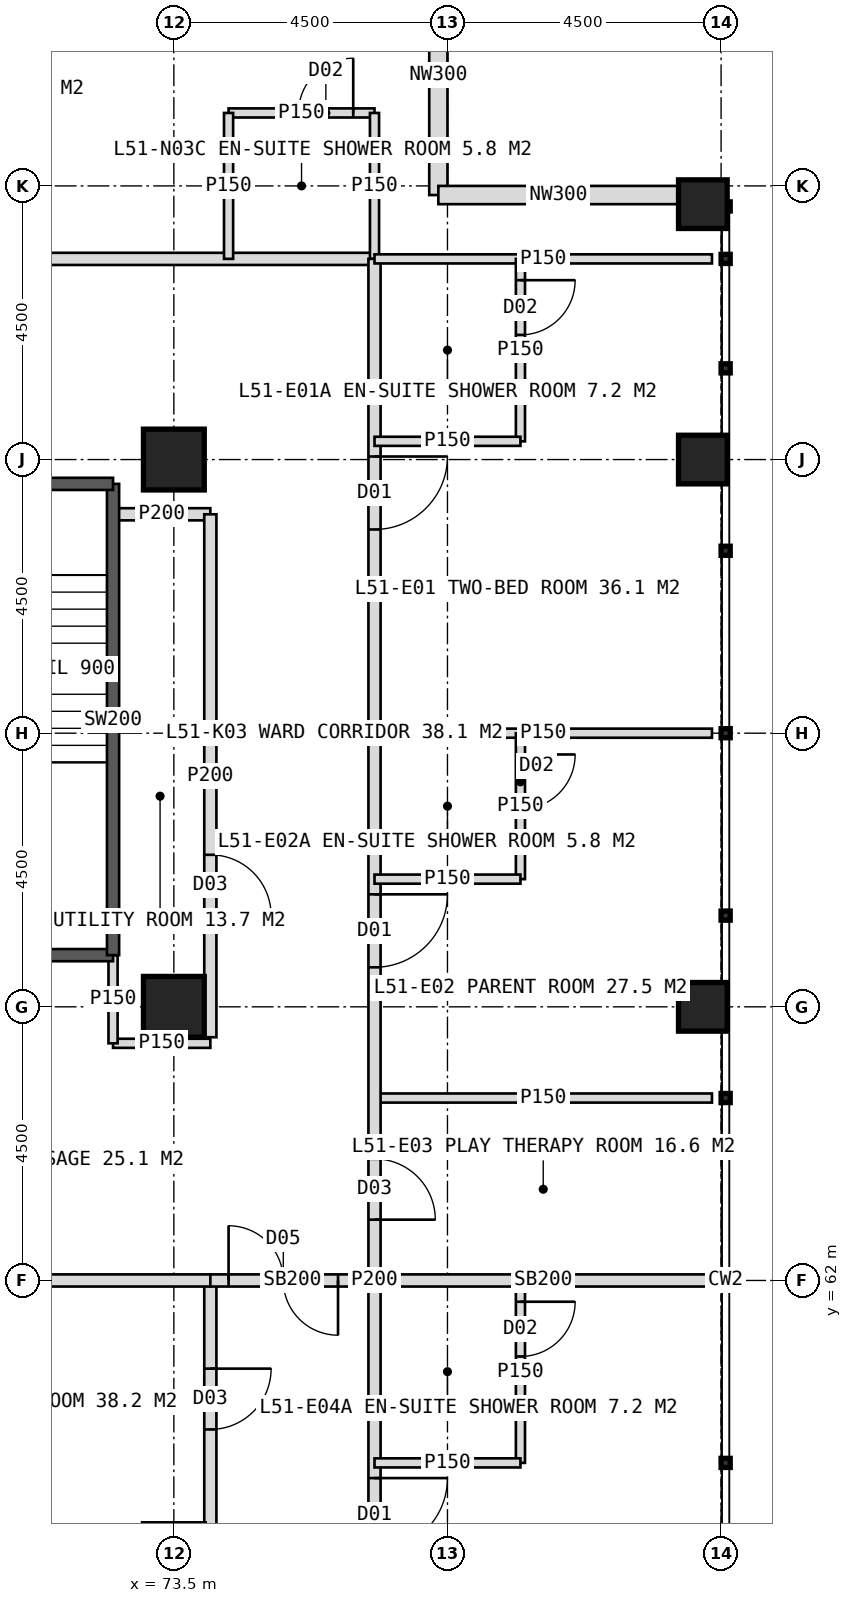
"""IFC4 building model, lengths in metres.
Left out: names, types, materials, properties, quantities, classifications, styles, units other than length and angle.
Written with IfcOpenShell. Run it as: python <this file> out.ifc"""

import sys

from ifc_helpers import new_model, si_unit, direction, frame, frame_2d, origin, origin_2d, place, context, subcontext, project, spatial, rectangle, hollow_rectangle, extrude, element, fill, save


model = new_model("IFC4")
c1 = context("Model", 3, precision=1e-05, world=origin(), true_north=direction((0.0, 1.0)))
c2 = subcontext(c1, "Body", "Model", "MODEL_VIEW")
j1 = project(units=[si_unit("LENGTHUNIT", "METRE"), si_unit("PLANEANGLEUNIT", "RADIAN")], contexts=[c1])
p1 = place(None, origin())
s1 = spatial("IfcSite", under=j1, at=p1, CompositionType="ELEMENT")
p2 = place(p1, origin())
s2 = spatial("IfcBuilding", under=s1, at=p2, CompositionType="ELEMENT")
p3 = place(p2, frame((0.0, 0.0, 213.0)))
s3 = spatial("IfcBuildingStorey", under=s2, at=p3, CompositionType="ELEMENT", Elevation=213.0)
for number, where, z_axis, x_axis in (
    (1, (73.5, 75.5, 0.0), (0.0, 0.0, 1.0), (1.0, 0.0, 0.0)),
    (2, (73.5, 66.5, 0.0), (0.0, 0.0, 1.0), (1.0, 0.0, 0.0)),
):
    element("IfcColumn", number, at=place(p3, frame(where, z_axis=z_axis, x_axis=x_axis)), inside=s3, PredefinedType="COLUMN", context=c2, shape_type="SweptSolid", body=[
        extrude(hollow_rectangle(XDim=1.0, YDim=1.0, WallThickness=0.1, at=origin_2d()), origin(), (0.0, 0.0, 1.0), 4.0),
    ])
for number, where, z_axis, x_axis in (
    (3, (82.2, 66.5, 0.0), (0.0, 0.0, 1.0), (1.0, 0.0, 0.0)),
    (4, (82.2, 75.5, 0.0), (0.0, 0.0, 1.0), (1.0, 0.0, 0.0)),
    (5, (82.2, 79.7, 0.0), (0.0, 0.0, 1.0), (1.0, 0.0, 0.0)),
):
    element("IfcColumn", number, at=place(p3, frame(where, z_axis=z_axis, x_axis=x_axis)), inside=s3, PredefinedType="COLUMN", context=c2, shape_type="SweptSolid", body=[
        extrude(hollow_rectangle(XDim=0.8, YDim=0.8, WallThickness=0.08, at=origin_2d()), origin(), (0.0, 0.0, 1.0), 4.0),
    ])
for number, where, z_axis, x_axis in (
    (6, (77.85, 83.8, 0.0), (0.0, 0.0, 1.0), (0.0, -1.0, 0.0)),
    (7, (77.85, 79.85, 0.0), (0.0, 0.0, 1.0), (1.0, 0.0, 0.0)),
):
    element("IfcWall", number, at=place(p3, frame(where, z_axis=z_axis, x_axis=x_axis)), inside=s3, PredefinedType="ELEMENTEDWALL", context=c2, shape_type="SweptSolid", body=[
        extrude(rectangle(XDim=3.95, YDim=0.3, at=frame_2d((1.975, 0.0))), origin(), (0.0, 0.0, 1.0), 2.85),
    ])
p4 = place(p3, frame((43.2, 78.8, 0.0), z_axis=(0.0, 0.0, 1.0), x_axis=(1.0, 0.0, 0.0)))
e8 = element("IfcWall", 8, at=p4, inside=s3, PredefinedType="PARTITIONING", context=c2, shape_type="SweptSolid", body=[
    extrude(rectangle(XDim=33.6, YDim=0.2, at=frame_2d((16.8, 0.0))), origin(), (0.0, 0.0, 1.0), 3.75),
])
p5 = place(p4, frame((4.9, 0.0, 0.0)))
e9 = element("IfcOpeningElement", 9, at=p5, cuts=e8, PredefinedType="OPENING", context=c2, shape_type="SweptSolid", body=[
    extrude(rectangle(XDim=1.0, YDim=2.1, at=frame_2d((0.5, 1.05))), frame((0.0, 0.11, 0.0), z_axis=(0.0, -1.0, 0.0), x_axis=(1.0, 0.0, 0.0)), (0.0, 0.0, 1.0), 0.22),
])
p6 = place(p4, frame((14.05, 0.0, 0.0)))
e10 = element("IfcOpeningElement", 10, at=p6, cuts=e8, PredefinedType="OPENING", context=c2, shape_type="SweptSolid", body=[
    extrude(rectangle(XDim=1.2, YDim=2.2, at=frame_2d((0.6, 1.1))), frame((0.0, 0.11, 0.0), z_axis=(0.0, -1.0, 0.0), x_axis=(1.0, 0.0, 0.0)), (0.0, 0.0, 1.0), 0.22),
])
p7 = place(p4, frame((22.45, 0.0, 0.0)))
e11 = element("IfcOpeningElement", 11, at=p7, cuts=e8, PredefinedType="OPENING", context=c2, shape_type="SweptSolid", body=[
    extrude(rectangle(XDim=1.2, YDim=2.2, at=frame_2d((0.6, 1.1))), frame((0.0, 0.11, 0.0), z_axis=(0.0, -1.0, 0.0), x_axis=(1.0, 0.0, 0.0)), (0.0, 0.0, 1.0), 0.22),
])
p8 = place(p3, frame((74.4, 81.2, 0.0), z_axis=(0.0, 0.0, 1.0), x_axis=(1.0, 0.0, 0.0)))
e12 = element("IfcWall", 12, at=p8, inside=s3, PredefinedType="PARTITIONING", context=c2, shape_type="SweptSolid", body=[
    extrude(rectangle(XDim=2.4, YDim=0.15, at=frame_2d((1.2, 0.0))), origin(), (0.0, 0.0, 1.0), 3.75),
])
p9 = place(p8, frame((1.15, 0.0, 0.0)))
e13 = element("IfcOpeningElement", 13, at=p9, cuts=e12, PredefinedType="OPENING", context=c2, shape_type="SweptSolid", body=[
    extrude(rectangle(XDim=0.9, YDim=2.1, at=frame_2d((0.45, 1.05))), frame((0.0, 0.085, 0.0), z_axis=(0.0, -1.0, 0.0), x_axis=(1.0, 0.0, 0.0)), (0.0, 0.0, 1.0), 0.17),
])
for number, where, z_axis, x_axis in (
    (14, (74.4, 78.8, 0.0), (0.0, 0.0, 1.0), (0.0, 1.0, 0.0)),
    (15, (76.8, 78.8, 0.0), (0.0, 0.0, 1.0), (0.0, 1.0, 0.0)),
):
    element("IfcWall", number, at=place(p3, frame(where, z_axis=z_axis, x_axis=x_axis)), inside=s3, PredefinedType="PARTITIONING", context=c2, shape_type="SweptSolid", body=[
        extrude(rectangle(XDim=2.4, YDim=0.15, at=frame_2d((1.2, 0.0))), origin(), (0.0, 0.0, 1.0), 3.75),
    ])
p10 = place(p3, frame((72.5, 74.6, 0.0), z_axis=(0.0, 0.0, 1.0), x_axis=(1.0, 0.0, 0.0)))
e16 = element("IfcWall", 16, at=p10, inside=s3, PredefinedType="PARTITIONING", context=c2, shape_type="SweptSolid", body=[
    extrude(rectangle(XDim=1.6, YDim=0.2, at=frame_2d((0.8, 0.0))), origin(), (0.0, 0.0, 1.0), 3.75),
])
for number, where, z_axis, x_axis in (
    (17, (76.8, 71.0, 0.0), (0.0, 0.0, 1.0), (1.0, 0.0, 0.0)),
    (18, (76.8, 65.0, 0.0), (0.0, 0.0, 1.0), (1.0, 0.0, 0.0)),
):
    element("IfcWall", number, at=place(p3, frame(where, z_axis=z_axis, x_axis=x_axis)), inside=s3, PredefinedType="PARTITIONING", context=c2, shape_type="SweptSolid", body=[
        extrude(rectangle(XDim=5.55, YDim=0.15, at=frame_2d((2.775, 0.0))), origin(), (0.0, 0.0, 1.0), 3.75),
    ])
p11 = place(p3, frame((76.8, 62.0, 0.0), z_axis=(0.0, 0.0, 1.0), x_axis=(1.0, 0.0, 0.0)))
e19 = element("IfcWall", 19, at=p11, inside=s3, PredefinedType="SOLIDWALL", context=c2, shape_type="SweptSolid", body=[
    extrude(rectangle(XDim=5.55, YDim=0.2, at=frame_2d((2.775, 0.0))), origin(), (0.0, 0.0, 1.0), 2.95),
])
p12 = place(p3, frame((76.8, 78.8, 0.0), z_axis=(0.0, 0.0, 1.0), x_axis=(0.0, -1.0, 0.0)))
e20 = element("IfcWall", 20, at=p12, inside=s3, PredefinedType="PARTITIONING", context=c2, shape_type="SweptSolid", body=[
    extrude(rectangle(XDim=33.6, YDim=0.2, at=frame_2d((16.8, 0.0))), origin(), (0.0, 0.0, 1.0), 3.75),
])
p13 = place(p12, frame((3.25, 0.0, 0.0)))
e21 = element("IfcOpeningElement", 21, at=p13, cuts=e20, PredefinedType="OPENING", context=c2, shape_type="SweptSolid", body=[
    extrude(rectangle(XDim=1.2, YDim=2.2, at=frame_2d((0.6, 1.1))), frame((0.0, 0.11, 0.0), z_axis=(0.0, -1.0, 0.0), x_axis=(1.0, 0.0, 0.0)), (0.0, 0.0, 1.0), 0.22),
])
p14 = place(p12, frame((10.45, 0.0, 0.0)))
e22 = element("IfcOpeningElement", 22, at=p14, cuts=e20, PredefinedType="OPENING", context=c2, shape_type="SweptSolid", body=[
    extrude(rectangle(XDim=1.2, YDim=2.2, at=frame_2d((0.6, 1.1))), frame((0.0, 0.11, 0.0), z_axis=(0.0, -1.0, 0.0), x_axis=(1.0, 0.0, 0.0)), (0.0, 0.0, 1.0), 0.22),
])
p15 = place(p12, frame((14.8, 0.0, 0.0)))
e23 = element("IfcOpeningElement", 23, at=p15, cuts=e20, PredefinedType="OPENING", context=c2, shape_type="SweptSolid", body=[
    extrude(rectangle(XDim=1.0, YDim=2.1, at=frame_2d((0.5, 1.05))), frame((0.0, 0.11, 0.0), z_axis=(0.0, -1.0, 0.0), x_axis=(1.0, 0.0, 0.0)), (0.0, 0.0, 1.0), 0.22),
])
p16 = place(p12, frame((20.05, 0.0, 0.0)))
e24 = element("IfcOpeningElement", 24, at=p16, cuts=e20, PredefinedType="OPENING", context=c2, shape_type="SweptSolid", body=[
    extrude(rectangle(XDim=1.2, YDim=2.2, at=frame_2d((0.6, 1.1))), frame((0.0, 0.11, 0.0), z_axis=(0.0, -1.0, 0.0), x_axis=(1.0, 0.0, 0.0)), (0.0, 0.0, 1.0), 0.22),
])
p17 = place(p12, frame((26.95, 0.0, 0.0)))
e25 = element("IfcOpeningElement", 25, at=p17, cuts=e20, PredefinedType="OPENING", context=c2, shape_type="SweptSolid", body=[
    extrude(rectangle(XDim=1.2, YDim=2.2, at=frame_2d((0.6, 1.1))), frame((0.0, 0.11, 0.0), z_axis=(0.0, -1.0, 0.0), x_axis=(1.0, 0.0, 0.0)), (0.0, 0.0, 1.0), 0.22),
])
p18 = place(p3, frame((76.8, 78.8, 0.0), z_axis=(0.0, 0.0, 1.0), x_axis=(1.0, 0.0, 0.0)))
e26 = element("IfcWall", 26, at=p18, inside=s3, PredefinedType="PARTITIONING", context=c2, shape_type="SweptSolid", body=[
    extrude(rectangle(XDim=5.55, YDim=0.15, at=frame_2d((2.775, 0.0))), origin(), (0.0, 0.0, 1.0), 3.75),
])
p19 = place(p3, frame((79.2, 78.8, 0.0), z_axis=(0.0, 0.0, 1.0), x_axis=(0.0, -1.0, 0.0)))
e27 = element("IfcWall", 27, at=p19, inside=s3, PredefinedType="PARTITIONING", context=c2, shape_type="SweptSolid", body=[
    extrude(rectangle(XDim=3.0, YDim=0.15, at=frame_2d((1.5, 0.0))), origin(), (0.0, 0.0, 1.0), 3.75),
])
p20 = place(p19, frame((0.35, 0.0, 0.0)))
e28 = element("IfcOpeningElement", 28, at=p20, cuts=e27, PredefinedType="OPENING", context=c2, shape_type="SweptSolid", body=[
    extrude(rectangle(XDim=0.9, YDim=2.1, at=frame_2d((0.45, 1.05))), frame((0.0, 0.085, 0.0), z_axis=(0.0, -1.0, 0.0), x_axis=(1.0, 0.0, 0.0)), (0.0, 0.0, 1.0), 0.17),
])
p21 = place(p3, frame((76.8, 75.8, 0.0), z_axis=(0.0, 0.0, 1.0), x_axis=(1.0, 0.0, 0.0)))
e29 = element("IfcWall", 29, at=p21, inside=s3, PredefinedType="PARTITIONING", context=c2, shape_type="SweptSolid", body=[
    extrude(rectangle(XDim=2.4, YDim=0.15, at=frame_2d((1.2, 0.0))), origin(), (0.0, 0.0, 1.0), 3.75),
])
p22 = place(p3, frame((79.2, 71.0, 0.0), z_axis=(0.0, 0.0, 1.0), x_axis=(0.0, -1.0, 0.0)))
e30 = element("IfcWall", 30, at=p22, inside=s3, PredefinedType="PARTITIONING", context=c2, shape_type="SweptSolid", body=[
    extrude(rectangle(XDim=2.4, YDim=0.15, at=frame_2d((1.2, 0.0))), origin(), (0.0, 0.0, 1.0), 3.75),
])
p23 = place(p22, frame((0.35, 0.0, 0.0)))
e31 = element("IfcOpeningElement", 31, at=p23, cuts=e30, PredefinedType="OPENING", context=c2, shape_type="SweptSolid", body=[
    extrude(rectangle(XDim=0.9, YDim=2.1, at=frame_2d((0.45, 1.05))), frame((0.0, 0.085, 0.0), z_axis=(0.0, -1.0, 0.0), x_axis=(1.0, 0.0, 0.0)), (0.0, 0.0, 1.0), 0.17),
])
p24 = place(p3, frame((76.8, 68.6, 0.0), z_axis=(0.0, 0.0, 1.0), x_axis=(1.0, 0.0, 0.0)))
e32 = element("IfcWall", 32, at=p24, inside=s3, PredefinedType="PARTITIONING", context=c2, shape_type="SweptSolid", body=[
    extrude(rectangle(XDim=2.4, YDim=0.15, at=frame_2d((1.2, 0.0))), origin(), (0.0, 0.0, 1.0), 3.75),
])
p25 = place(p3, frame((79.2, 62.0, 0.0), z_axis=(0.0, 0.0, 1.0), x_axis=(0.0, -1.0, 0.0)))
e33 = element("IfcWall", 33, at=p25, inside=s3, PredefinedType="PARTITIONING", context=c2, shape_type="SweptSolid", body=[
    extrude(rectangle(XDim=3.0, YDim=0.15, at=frame_2d((1.5, 0.0))), origin(), (0.0, 0.0, 1.0), 3.75),
])
p26 = place(p25, frame((0.35, 0.0, 0.0)))
e34 = element("IfcOpeningElement", 34, at=p26, cuts=e33, PredefinedType="OPENING", context=c2, shape_type="SweptSolid", body=[
    extrude(rectangle(XDim=0.9, YDim=2.1, at=frame_2d((0.45, 1.05))), frame((0.0, 0.085, 0.0), z_axis=(0.0, -1.0, 0.0), x_axis=(1.0, 0.0, 0.0)), (0.0, 0.0, 1.0), 0.17),
])
p27 = place(p3, frame((76.8, 59.0, 0.0), z_axis=(0.0, 0.0, 1.0), x_axis=(1.0, 0.0, 0.0)))
e35 = element("IfcWall", 35, at=p27, inside=s3, PredefinedType="PARTITIONING", context=c2, shape_type="SweptSolid", body=[
    extrude(rectangle(XDim=2.4, YDim=0.15, at=frame_2d((1.2, 0.0))), origin(), (0.0, 0.0, 1.0), 3.75),
])
p28 = place(p3, frame((74.1, 74.6, 0.0), z_axis=(0.0, 0.0, 1.0), x_axis=(0.0, -1.0, 0.0)))
e36 = element("IfcWall", 36, at=p28, inside=s3, PredefinedType="PARTITIONING", context=c2, shape_type="SweptSolid", body=[
    extrude(rectangle(XDim=8.6, YDim=0.2, at=frame_2d((4.3, 0.0))), origin(), (0.0, 0.0, 1.0), 3.75),
])
p29 = place(p28, frame((5.6, 0.0, 0.0)))
e37 = element("IfcOpeningElement", 37, at=p29, cuts=e36, PredefinedType="OPENING", context=c2, shape_type="SweptSolid", body=[
    extrude(rectangle(XDim=1.0, YDim=2.1, at=frame_2d((0.5, 1.05))), frame((0.0, 0.11, 0.0), z_axis=(0.0, -1.0, 0.0), x_axis=(1.0, 0.0, 0.0)), (0.0, 0.0, 1.0), 0.22),
])
p30 = place(p3, frame((74.1, 62.0, 0.0), z_axis=(0.0, 0.0, 1.0), x_axis=(0.0, -1.0, 0.0)))
e38 = element("IfcWall", 38, at=p30, inside=s3, PredefinedType="PARTITIONING", context=c2, shape_type="SweptSolid", body=[
    extrude(rectangle(XDim=14.1, YDim=0.2, at=frame_2d((7.05, 0.0))), origin(), (0.0, 0.0, 1.0), 3.75),
])
p31 = place(p30, frame((1.45, 0.0, 0.0)))
e39 = element("IfcOpeningElement", 39, at=p31, cuts=e38, PredefinedType="OPENING", context=c2, shape_type="SweptSolid", body=[
    extrude(rectangle(XDim=1.0, YDim=2.1, at=frame_2d((0.5, 1.05))), frame((0.0, 0.11, 0.0), z_axis=(0.0, -1.0, 0.0), x_axis=(1.0, 0.0, 0.0)), (0.0, 0.0, 1.0), 0.22),
])
p32 = place(p30, frame((10.3, 0.0, 0.0)))
e40 = element("IfcOpeningElement", 40, at=p32, cuts=e38, PredefinedType="OPENING", context=c2, shape_type="SweptSolid", body=[
    extrude(rectangle(XDim=1.0, YDim=2.1, at=frame_2d((0.5, 1.05))), frame((0.0, 0.11, 0.0), z_axis=(0.0, -1.0, 0.0), x_axis=(1.0, 0.0, 0.0)), (0.0, 0.0, 1.0), 0.22),
])
p33 = place(p3, frame((72.5, 65.9, 0.0), z_axis=(0.0, 0.0, 1.0), x_axis=(1.0, 0.0, 0.0)))
e41 = element("IfcWall", 41, at=p33, inside=s3, PredefinedType="PARTITIONING", context=c2, shape_type="SweptSolid", body=[
    extrude(rectangle(XDim=1.6, YDim=0.15, at=frame_2d((0.8, 0.0))), origin(), (0.0, 0.0, 1.0), 3.75),
])
p34 = place(p3, frame((69.0, 62.0, 0.0), z_axis=(0.0, 0.0, 1.0), x_axis=(1.0, 0.0, 0.0)))
e42 = element("IfcWall", 42, at=p34, inside=s3, PredefinedType="SOLIDWALL", context=c2, shape_type="SweptSolid", body=[
    extrude(rectangle(XDim=5.1, YDim=0.2, at=frame_2d((2.55, 0.0))), origin(), (0.0, 0.0, 1.0), 2.95),
])
p35 = place(p3, frame((74.1, 62.0, 0.0), z_axis=(0.0, 0.0, 1.0), x_axis=(1.0, 0.0, 0.0)))
e43 = element("IfcWall", 43, at=p35, inside=s3, PredefinedType="SOLIDWALL", context=c2, shape_type="SweptSolid", body=[
    extrude(rectangle(XDim=2.7, YDim=0.2, at=frame_2d((1.35, 0.0))), origin(), (0.0, 0.0, 1.0), 2.95),
])
p36 = place(p35, frame((0.3, 0.0, 0.0)))
e44 = element("IfcOpeningElement", 44, at=p36, cuts=e43, PredefinedType="OPENING", context=c2, shape_type="SweptSolid", body=[
    extrude(rectangle(XDim=1.8, YDim=2.2, at=frame_2d((0.9, 1.1))), frame((0.0, 0.11, 0.0), z_axis=(0.0, -1.0, 0.0), x_axis=(1.0, 0.0, 0.0)), (0.0, 0.0, 1.0), 0.22),
])
p37 = place(p3, frame((72.5, 65.9, 0.0), z_axis=(0.0, 0.0, 1.0), x_axis=(0.0, 1.0, 0.0)))
e45 = element("IfcWall", 45, at=p37, inside=s3, PredefinedType="PARTITIONING", context=c2, shape_type="SweptSolid", body=[
    extrude(rectangle(XDim=1.45, YDim=0.15, at=frame_2d((0.725, 0.0))), origin(), (0.0, 0.0, 1.0), 3.75),
])
p38 = place(p3, frame((69.0, 67.35, 0.0), z_axis=(0.0, 0.0, 1.0), x_axis=(1.0, 0.0, 0.0)))
e46 = element("IfcWall", 46, at=p38, inside=s3, PredefinedType="SOLIDWALL", context=c2, shape_type="SweptSolid", body=[
    extrude(rectangle(XDim=3.5, YDim=0.2, at=frame_2d((1.75, 0.0))), origin(), (0.0, 0.0, 1.0), 3.75),
])
p39 = place(p3, frame((72.5, 67.35, 0.0), z_axis=(0.0, 0.0, 1.0), x_axis=(0.0, 1.0, 0.0)))
e47 = element("IfcWall", 47, at=p39, inside=s3, PredefinedType="SOLIDWALL", context=c2, shape_type="SweptSolid", body=[
    extrude(rectangle(XDim=7.75, YDim=0.2, at=frame_2d((3.875, 0.0))), origin(), (0.0, 0.0, 1.0), 3.75),
])
p40 = place(p3, frame((69.0, 75.1, 0.0), z_axis=(0.0, 0.0, 1.0), x_axis=(1.0, 0.0, 0.0)))
e48 = element("IfcWall", 48, at=p40, inside=s3, PredefinedType="SOLIDWALL", context=c2, shape_type="SweptSolid", body=[
    extrude(rectangle(XDim=3.5, YDim=0.2, at=frame_2d((1.75, 0.0))), origin(), (0.0, 0.0, 1.0), 3.75),
])
p41 = place(p40, frame((1.15, 0.0, 0.0)))
e49 = element("IfcOpeningElement", 49, at=p41, cuts=e48, PredefinedType="OPENING", context=c2, shape_type="SweptSolid", body=[
    extrude(rectangle(XDim=1.2, YDim=2.1, at=frame_2d((0.6, 1.05))), frame((0.0, 0.11, 0.0), z_axis=(0.0, -1.0, 0.0), x_axis=(1.0, 0.0, 0.0)), (0.0, 0.0, 1.0), 0.22),
])
p42 = place(p9, origin())
e50 = element("IfcDoor", 50, at=p42, inside=s3, OperationType="SINGLE_SWING_RIGHT", PredefinedType="DOOR", context=c2, shape_type="SweptSolid", body=[
    extrude(rectangle(XDim=0.9, YDim=2.1, at=frame_2d((0.45, 1.05))), frame((0.0, 0.025, 0.0), z_axis=(0.0, -1.0, 0.0), x_axis=(1.0, 0.0, 0.0)), (0.0, 0.0, 1.0), 0.05),
])
fill(e13, e50)
p43 = place(p13, origin())
e51 = element("IfcDoor", 51, at=p43, inside=s3, OperationType="SINGLE_SWING_LEFT", PredefinedType="DOOR", context=c2, shape_type="SweptSolid", body=[
    extrude(rectangle(XDim=1.2, YDim=2.2, at=frame_2d((0.6, 1.1))), frame((0.0, 0.025, 0.0), z_axis=(0.0, -1.0, 0.0), x_axis=(1.0, 0.0, 0.0)), (0.0, 0.0, 1.0), 0.05),
])
fill(e21, e51)
p44 = place(p20, origin())
e52 = element("IfcDoor", 52, at=p44, inside=s3, OperationType="SINGLE_SWING_LEFT", PredefinedType="DOOR", context=c2, shape_type="SweptSolid", body=[
    extrude(rectangle(XDim=0.9, YDim=2.1, at=frame_2d((0.45, 1.05))), frame((0.0, 0.025, 0.0), z_axis=(0.0, -1.0, 0.0), x_axis=(1.0, 0.0, 0.0)), (0.0, 0.0, 1.0), 0.05),
])
fill(e28, e52)
p45 = place(p14, origin())
e53 = element("IfcDoor", 53, at=p45, inside=s3, OperationType="SINGLE_SWING_LEFT", PredefinedType="DOOR", context=c2, shape_type="SweptSolid", body=[
    extrude(rectangle(XDim=1.2, YDim=2.2, at=frame_2d((0.6, 1.1))), frame((0.0, 0.025, 0.0), z_axis=(0.0, -1.0, 0.0), x_axis=(1.0, 0.0, 0.0)), (0.0, 0.0, 1.0), 0.05),
])
fill(e22, e53)
p46 = place(p23, origin())
e54 = element("IfcDoor", 54, at=p46, inside=s3, OperationType="SINGLE_SWING_LEFT", PredefinedType="DOOR", context=c2, shape_type="SweptSolid", body=[
    extrude(rectangle(XDim=0.9, YDim=2.1, at=frame_2d((0.45, 1.05))), frame((0.0, 0.025, 0.0), z_axis=(0.0, -1.0, 0.0), x_axis=(1.0, 0.0, 0.0)), (0.0, 0.0, 1.0), 0.05),
])
fill(e31, e54)
p47 = place(p15, origin())
e55 = element("IfcDoor", 55, at=p47, inside=s3, OperationType="SINGLE_SWING_RIGHT", PredefinedType="DOOR", context=c2, shape_type="SweptSolid", body=[
    extrude(rectangle(XDim=1.0, YDim=2.1, at=frame_2d((0.5, 1.05))), frame((0.0, 0.025, 0.0), z_axis=(0.0, -1.0, 0.0), x_axis=(1.0, 0.0, 0.0)), (0.0, 0.0, 1.0), 0.05),
])
fill(e23, e55)
p48 = place(p16, origin())
e56 = element("IfcDoor", 56, at=p48, inside=s3, OperationType="SINGLE_SWING_LEFT", PredefinedType="DOOR", context=c2, shape_type="SweptSolid", body=[
    extrude(rectangle(XDim=1.2, YDim=2.2, at=frame_2d((0.6, 1.1))), frame((0.0, 0.025, 0.0), z_axis=(0.0, -1.0, 0.0), x_axis=(1.0, 0.0, 0.0)), (0.0, 0.0, 1.0), 0.05),
])
fill(e24, e56)
p49 = place(p26, origin())
e57 = element("IfcDoor", 57, at=p49, inside=s3, OperationType="SINGLE_SWING_LEFT", PredefinedType="DOOR", context=c2, shape_type="SweptSolid", body=[
    extrude(rectangle(XDim=0.9, YDim=2.1, at=frame_2d((0.45, 1.05))), frame((0.0, 0.025, 0.0), z_axis=(0.0, -1.0, 0.0), x_axis=(1.0, 0.0, 0.0)), (0.0, 0.0, 1.0), 0.05),
])
fill(e34, e57)
p50 = place(p29, origin())
e58 = element("IfcDoor", 58, at=p50, inside=s3, OperationType="SINGLE_SWING_RIGHT", PredefinedType="DOOR", context=c2, shape_type="SweptSolid", body=[
    extrude(rectangle(XDim=1.0, YDim=2.1, at=frame_2d((0.5, 1.05))), frame((0.0, 0.025, 0.0), z_axis=(0.0, -1.0, 0.0), x_axis=(1.0, 0.0, 0.0)), (0.0, 0.0, 1.0), 0.05),
])
fill(e37, e58)
p51 = place(p31, origin())
e59 = element("IfcDoor", 59, at=p51, inside=s3, OperationType="SINGLE_SWING_LEFT", PredefinedType="DOOR", context=c2, shape_type="SweptSolid", body=[
    extrude(rectangle(XDim=1.0, YDim=2.1, at=frame_2d((0.5, 1.05))), frame((0.0, 0.025, 0.0), z_axis=(0.0, -1.0, 0.0), x_axis=(1.0, 0.0, 0.0)), (0.0, 0.0, 1.0), 0.05),
])
fill(e39, e59)
p52 = place(p36, origin())
e60 = element("IfcDoor", 60, at=p52, inside=s3, OperationType="DOUBLE_DOOR_DOUBLE_SWING", PredefinedType="DOOR", context=c2, shape_type="SweptSolid", body=[
    extrude(rectangle(XDim=1.8, YDim=2.2, at=frame_2d((0.9, 1.1))), frame((0.0, 0.025, 0.0), z_axis=(0.0, -1.0, 0.0), x_axis=(1.0, 0.0, 0.0)), (0.0, 0.0, 1.0), 0.05),
])
fill(e44, e60)
save(model, sys.argv[1])
